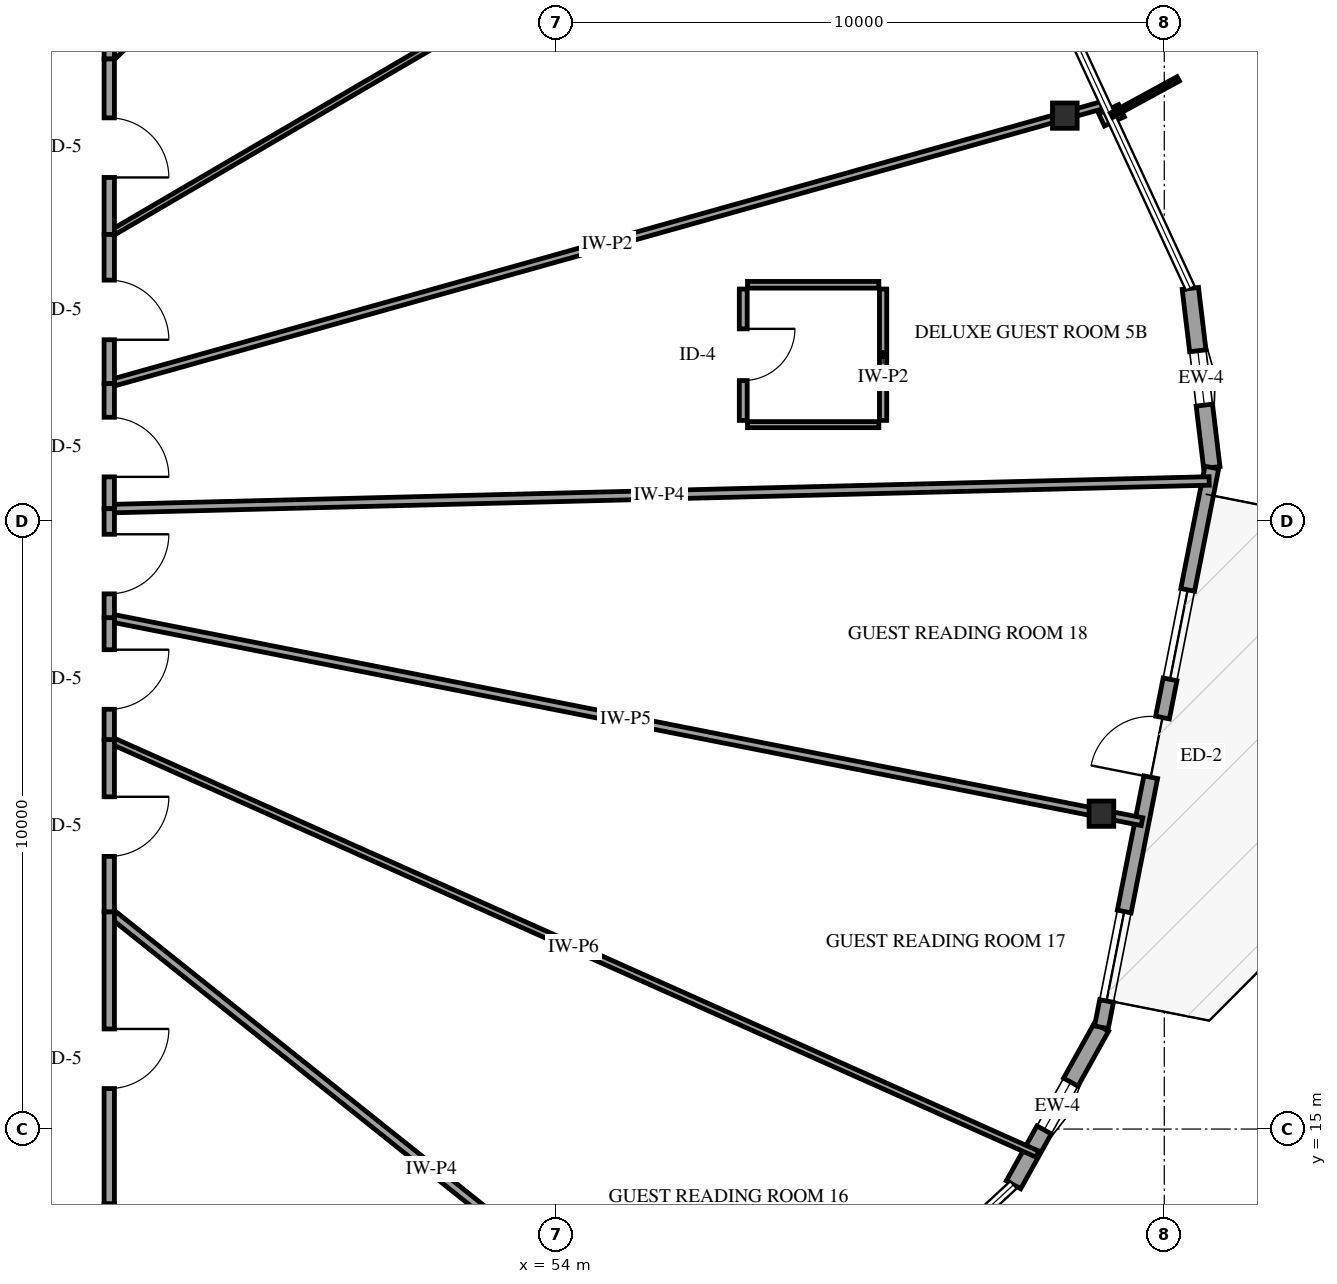
"""IFC4 building model, lengths in metres.
Left out: names, types, materials, properties, quantities, classifications, styles, units other than length and angle.
Written with IfcOpenShell. Run it as: python <this file> out.ifc"""

import sys

from ifc_helpers import new_model, si_unit, direction, frame, frame_2d, origin, origin_2d, place, context, subcontext, project, spatial, rectangle, i_section, extrude, element, fill, save


model = new_model("IFC4")
c1 = context("Model", 3, precision=1e-05, world=origin(), true_north=direction((0.0, 1.0)))
c2 = subcontext(c1, "Body", "Model", "MODEL_VIEW")
j1 = project(units=[si_unit("LENGTHUNIT", "METRE"), si_unit("PLANEANGLEUNIT", "RADIAN")], contexts=[c1])
p1 = place(None, origin())
s1 = spatial("IfcSite", under=j1, at=p1, CompositionType="ELEMENT")
p2 = place(p1, origin())
s2 = spatial("IfcBuilding", under=s1, at=p2, CompositionType="ELEMENT")
p3 = place(p2, frame((0.0, 0.0, 190.6)))
s3 = spatial("IfcBuildingStorey", under=s2, at=p3, CompositionType="ELEMENT", Elevation=190.6)
for number, where, z_axis, x_axis in (
    (1, (62.365, 31.666, -0.3), (0.0, 0.0, 1.0), (1.0, 0.0, 0.0)),
    (2, (62.966, 20.186, -0.3), (0.0, 0.0, 1.0), (1.0, 0.0, 0.0)),
):
    element("IfcColumn", number, at=place(p3, frame(where, z_axis=z_axis, x_axis=x_axis)), inside=s3, PredefinedType="COLUMN", context=c2, shape_type="SweptSolid", body=[
        extrude(i_section(OverallWidth=0.406, OverallDepth=0.416, WebThickness=0.03, FlangeThickness=0.048, FilletRadius=0.038, at=origin_2d()), origin(), (0.0, 0.0, 1.0), 3.9),
    ])
p4 = place(p3, frame((61.521, 14.083, 0.0), z_axis=(0.0, 0.0, 1.0), x_axis=(0.48724212473, 0.87326691904, 0.0)))
e3 = element("IfcWall", 3, at=p4, inside=s3, PredefinedType="SOLIDWALL", context=c2, shape_type="SweptSolid", body=[
    extrude(rectangle(XDim=2.967, YDim=0.27, at=frame_2d((1.483, 0.0))), origin(), (0.0, 0.0, 1.0), 2.679),
])
p5 = place(p4, frame((1.033, 0.0, 0.75)))
e4 = element("IfcOpeningElement", 4, at=p5, cuts=e3, PredefinedType="OPENING", context=c2, shape_type="SweptSolid", body=[
    extrude(rectangle(XDim=0.9, YDim=1.5, at=frame_2d((0.45, 0.75))), frame((0.0, 0.145, 0.0), z_axis=(0.0, -1.0, 0.0), x_axis=(1.0, 0.0, 0.0)), (0.0, 0.0, 1.0), 0.29),
])
p6 = place(p3, frame((64.782, 25.879, 0.0), z_axis=(0.0, 0.0, 1.0), x_axis=(-0.119080319242, 0.9928846245, 0.0)))
e5 = element("IfcWall", 5, at=p6, inside=s3, PredefinedType="SOLIDWALL", context=c2, shape_type="SweptSolid", body=[
    extrude(rectangle(XDim=2.967, YDim=0.27, at=frame_2d((1.483, 0.0))), origin(), (0.0, 0.0, 1.0), 2.679),
])
p7 = place(p6, frame((1.033, 0.0, 0.75)))
e6 = element("IfcOpeningElement", 6, at=p7, cuts=e5, PredefinedType="OPENING", context=c2, shape_type="SweptSolid", body=[
    extrude(rectangle(XDim=0.9, YDim=1.5, at=frame_2d((0.45, 0.75))), frame((0.0, 0.145, 0.0), z_axis=(0.0, -1.0, 0.0), x_axis=(1.0, 0.0, 0.0)), (0.0, 0.0, 1.0), 0.29),
])
p8 = place(p3, frame((62.966, 16.674, 0.0), z_axis=(0.0, 0.0, 1.0), x_axis=(0.193553277769, 0.981089765855, 0.0)))
e7 = element("IfcWall", 7, at=p8, inside=s3, PredefinedType="SOLIDWALL", context=c2, shape_type="SweptSolid", body=[
    extrude(rectangle(XDim=9.382, YDim=0.23, at=frame_2d((4.691, 0.0))), origin(), (0.0, 0.0, 1.0), 2.679),
])
p9 = place(p8, frame((4.191, 0.0, 0.0)))
e8 = element("IfcOpeningElement", 8, at=p9, cuts=e7, PredefinedType="OPENING", context=c2, shape_type="SweptSolid", body=[
    extrude(rectangle(XDim=1.0, YDim=2.15, at=frame_2d((0.5, 1.075))), frame((0.0, 0.125, 0.0), z_axis=(0.0, -1.0, 0.0), x_axis=(1.0, 0.0, 0.0)), (0.0, 0.0, 1.0), 0.25),
])
p10 = place(p8, frame((0.44, 0.0, 0.72)))
e9 = element("IfcOpeningElement", 9, at=p10, cuts=e7, PredefinedType="OPENING", context=c2, shape_type="SweptSolid", body=[
    extrude(rectangle(XDim=1.5, YDim=1.7, at=frame_2d((0.75, 0.85))), frame((0.0, 0.125, 0.0), z_axis=(0.0, -1.0, 0.0), x_axis=(1.0, 0.0, 0.0)), (0.0, 0.0, 1.0), 0.25),
])
p11 = place(p8, frame((5.831, 0.0, 0.72)))
e10 = element("IfcOpeningElement", 10, at=p11, cuts=e7, PredefinedType="OPENING", context=c2, shape_type="SweptSolid", body=[
    extrude(rectangle(XDim=1.5, YDim=1.7, at=frame_2d((0.75, 0.85))), frame((0.0, 0.125, 0.0), z_axis=(0.0, -1.0, 0.0), x_axis=(1.0, 0.0, 0.0)), (0.0, 0.0, 1.0), 0.25),
])
p12 = place(p3, frame((64.738, 25.658, 0.0), z_axis=(0.0, 0.0, 1.0), x_axis=(-0.999682305801, -0.025204909598, 0.0)))
e11 = element("IfcWall", 11, at=p12, inside=s3, PredefinedType="PARTITIONING", context=c2, shape_type="SweptSolid", body=[
    extrude(rectangle(XDim=18.094, YDim=0.14, at=frame_2d((9.047, 0.0))), origin(), (0.0, 0.0, 1.0), 3.3),
])
p13 = place(p3, frame((46.65, 23.41, 0.0), z_axis=(0.0, 0.0, 1.0), x_axis=(0.981040630624, -0.193802169918, 0.0)))
e12 = element("IfcWall", 12, at=p13, inside=s3, PredefinedType="PARTITIONING", context=c2, shape_type="SweptSolid", body=[
    extrude(rectangle(XDim=17.311, YDim=0.13, at=frame_2d((8.656, 0.0))), origin(), (0.0, 0.0, 1.0), 2.595),
])
p14 = place(p3, frame((46.65, 27.258, 0.0), z_axis=(0.0, 0.0, 1.0), x_axis=(0.962850938161, 0.270033462525, 0.0)))
e13 = element("IfcWall", 13, at=p14, inside=s3, PredefinedType="PARTITIONING", context=c2, shape_type="SweptSolid", body=[
    extrude(rectangle(XDim=17.009, YDim=0.12, at=frame_2d((8.504, 0.0))), origin(), (0.0, 0.0, 1.0), 3.3),
])
p15 = place(p3, frame((46.65, 21.405, 0.0), z_axis=(0.0, 0.0, 1.0), x_axis=(0.913073615339, -0.4077947682, 0.0)))
e14 = element("IfcWall", 14, at=p15, inside=s3, PredefinedType="PARTITIONING", context=c2, shape_type="SweptSolid", body=[
    extrude(rectangle(XDim=16.719, YDim=0.11, at=frame_2d((8.36, 0.0))), origin(), (0.0, 0.0, 1.0), 3.3),
])
p16 = place(p3, frame((46.65, 29.711, 0.0), z_axis=(0.0, 0.0, 1.0), x_axis=(0.863122930512, 0.504993868106, 0.0)))
e15 = element("IfcWall", 15, at=p16, inside=s3, PredefinedType="PARTITIONING", context=c2, shape_type="SweptSolid", body=[
    extrude(rectangle(XDim=15.771, YDim=0.1, at=frame_2d((7.885, 0.0))), origin(), (0.0, 0.0, 1.0), 2.678),
])
p17 = place(p3, frame((46.65, 18.573, 0.0), z_axis=(0.0, 0.0, 1.0), x_axis=(0.781465935212, -0.623947908165, 0.0)))
e16 = element("IfcWall", 16, at=p17, inside=s3, PredefinedType="PARTITIONING", context=c2, shape_type="SweptSolid", body=[
    extrude(rectangle(XDim=13.554, YDim=0.14, at=frame_2d((6.777, 0.0))), origin(), (0.0, 0.0, 1.0), 3.3),
])
p18 = place(p3, frame((46.65, 32.597, 0.0), z_axis=(0.0, 0.0, 1.0), x_axis=(0.727340314182, 0.686276961121, 0.0)))
e17 = element("IfcWall", 17, at=p18, inside=s3, PredefinedType="PARTITIONING", context=c2, shape_type="SweptSolid", body=[
    extrude(rectangle(XDim=12.373, YDim=0.13, at=frame_2d((6.186, 0.0))), origin(), (0.0, 0.0, 1.0), 2.595),
])
p19 = place(p3, frame((46.65, 13.769, 0.0), z_axis=(0.0, 0.0, 1.0), x_axis=(0.582553277152, -0.812792519207, 0.0)))
e18 = element("IfcWall", 18, at=p19, inside=s3, PredefinedType="PARTITIONING", context=c2, shape_type="SweptSolid", body=[
    extrude(rectangle(XDim=9.004, YDim=0.11, at=frame_2d((4.502, 0.0))), origin(), (0.0, 0.0, 1.0), 2.678),
])
p20 = place(p3, frame((46.65, 37.695, 0.0), z_axis=(0.0, 0.0, 1.0), x_axis=(0.0, -1.0, 0.0)))
e19 = element("IfcWall", 19, at=p20, inside=s3, PredefinedType="PARTITIONING", context=c2, shape_type="SweptSolid", body=[
    extrude(rectangle(XDim=5.098, YDim=0.17, at=frame_2d((2.549, 0.0))), origin(), (0.0, 0.0, 1.0), 3.3),
])
p21 = place(p20, frame((2.074, 0.0, 0.0)))
e20 = element("IfcOpeningElement", 20, at=p21, cuts=e19, PredefinedType="OPENING", context=c2, shape_type="SweptSolid", body=[
    extrude(rectangle(XDim=0.98, YDim=2.15, at=frame_2d((0.49, 1.075))), frame((0.0, 0.095, 0.0), z_axis=(0.0, -1.0, 0.0), x_axis=(1.0, 0.0, 0.0)), (0.0, 0.0, 1.0), 0.19),
])
p22 = place(p3, frame((46.65, 18.573, 0.0), z_axis=(0.0, 0.0, 1.0), x_axis=(0.0, -1.0, 0.0)))
e21 = element("IfcWall", 21, at=p22, inside=s3, PredefinedType="PARTITIONING", context=c2, shape_type="SweptSolid", body=[
    extrude(rectangle(XDim=4.804, YDim=0.17, at=frame_2d((2.402, 0.0))), origin(), (0.0, 0.0, 1.0), 3.3),
])
p23 = place(p22, frame((1.927, 0.0, 0.0)))
e22 = element("IfcOpeningElement", 22, at=p23, cuts=e21, PredefinedType="OPENING", context=c2, shape_type="SweptSolid", body=[
    extrude(rectangle(XDim=0.98, YDim=2.15, at=frame_2d((0.49, 1.075))), frame((0.0, 0.095, 0.0), z_axis=(0.0, -1.0, 0.0), x_axis=(1.0, 0.0, 0.0)), (0.0, 0.0, 1.0), 0.19),
])
p24 = place(p3, frame((46.65, 32.597, 0.0), z_axis=(0.0, 0.0, 1.0), x_axis=(0.0, -1.0, 0.0)))
e23 = element("IfcWall", 23, at=p24, inside=s3, PredefinedType="PARTITIONING", context=c2, shape_type="SweptSolid", body=[
    extrude(rectangle(XDim=2.886, YDim=0.17, at=frame_2d((1.443, 0.0))), origin(), (0.0, 0.0, 1.0), 3.3),
])
p25 = place(p24, frame((0.968, 0.0, 0.0)))
e24 = element("IfcOpeningElement", 24, at=p25, cuts=e23, PredefinedType="OPENING", context=c2, shape_type="SweptSolid", body=[
    extrude(rectangle(XDim=0.98, YDim=2.15, at=frame_2d((0.49, 1.075))), frame((0.0, 0.095, 0.0), z_axis=(0.0, -1.0, 0.0), x_axis=(1.0, 0.0, 0.0)), (0.0, 0.0, 1.0), 0.19),
])
p26 = place(p3, frame((46.65, 21.405, 0.0), z_axis=(0.0, 0.0, 1.0), x_axis=(0.0, -1.0, 0.0)))
e25 = element("IfcWall", 25, at=p26, inside=s3, PredefinedType="PARTITIONING", context=c2, shape_type="SweptSolid", body=[
    extrude(rectangle(XDim=2.832, YDim=0.17, at=frame_2d((1.416, 0.0))), origin(), (0.0, 0.0, 1.0), 3.3),
])
p27 = place(p26, frame((0.941, 0.0, 0.0)))
e26 = element("IfcOpeningElement", 26, at=p27, cuts=e25, PredefinedType="OPENING", context=c2, shape_type="SweptSolid", body=[
    extrude(rectangle(XDim=0.98, YDim=2.15, at=frame_2d((0.49, 1.075))), frame((0.0, 0.095, 0.0), z_axis=(0.0, -1.0, 0.0), x_axis=(1.0, 0.0, 0.0)), (0.0, 0.0, 1.0), 0.19),
])
p28 = place(p3, frame((46.65, 29.711, 0.0), z_axis=(0.0, 0.0, 1.0), x_axis=(0.0, -1.0, 0.0)))
e27 = element("IfcWall", 27, at=p28, inside=s3, PredefinedType="PARTITIONING", context=c2, shape_type="SweptSolid", body=[
    extrude(rectangle(XDim=2.453, YDim=0.17, at=frame_2d((1.227, 0.0))), origin(), (0.0, 0.0, 1.0), 3.3),
])
p29 = place(p28, frame((0.751, 0.0, 0.0)))
e28 = element("IfcOpeningElement", 28, at=p29, cuts=e27, PredefinedType="OPENING", context=c2, shape_type="SweptSolid", body=[
    extrude(rectangle(XDim=0.98, YDim=2.15, at=frame_2d((0.49, 1.075))), frame((0.0, 0.095, 0.0), z_axis=(0.0, -1.0, 0.0), x_axis=(1.0, 0.0, 0.0)), (0.0, 0.0, 1.0), 0.19),
])
p30 = place(p3, frame((57.076, 28.814, 0.0), z_axis=(0.0, 0.0, 1.0), x_axis=(0.0, -1.0, 0.0)))
e29 = element("IfcWall", 29, at=p30, inside=s3, PredefinedType="PARTITIONING", context=c2, shape_type="SweptSolid", body=[
    extrude(rectangle(XDim=2.16, YDim=0.13, at=frame_2d((1.08, 0.0))), origin(), (0.0, 0.0, 1.0), 3.3),
])
p31 = place(p30, frame((0.655, 0.0, 0.0)))
e30 = element("IfcOpeningElement", 30, at=p31, cuts=e29, PredefinedType="OPENING", context=c2, shape_type="SweptSolid", body=[
    extrude(rectangle(XDim=0.85, YDim=2.1, at=frame_2d((0.425, 1.05))), frame((0.0, 0.075, 0.0), z_axis=(0.0, -1.0, 0.0), x_axis=(1.0, 0.0, 0.0)), (0.0, 0.0, 1.0), 0.15),
])
p32 = place(p3, frame((59.376, 26.654, 0.0), z_axis=(0.0, 0.0, 1.0), x_axis=(0.0, 1.0, 0.0)))
e31 = element("IfcWall", 31, at=p32, inside=s3, PredefinedType="PARTITIONING", context=c2, shape_type="SweptSolid", body=[
    extrude(rectangle(XDim=2.16, YDim=0.12, at=frame_2d((1.08, 0.0))), origin(), (0.0, 0.0, 1.0), 3.3),
])
p33 = place(p3, frame((59.306, 28.884, 0.0), z_axis=(0.0, 0.0, 1.0), x_axis=(-1.0, 0.0, 0.0)))
e32 = element("IfcWall", 32, at=p33, inside=s3, PredefinedType="PARTITIONING", context=c2, shape_type="SweptSolid", body=[
    extrude(rectangle(XDim=2.16, YDim=0.11, at=frame_2d((1.08, 0.0))), origin(), (0.0, 0.0, 1.0), 3.3),
])
p34 = place(p3, frame((57.146, 26.584, 0.0), z_axis=(0.0, 0.0, 1.0), x_axis=(1.0, 0.0, 0.0)))
e33 = element("IfcWall", 33, at=p34, inside=s3, PredefinedType="PARTITIONING", context=c2, shape_type="SweptSolid", body=[
    extrude(rectangle(XDim=2.16, YDim=0.1, at=frame_2d((1.08, 0.0))), origin(), (0.0, 0.0, 1.0), 3.3),
])
p35 = place(p3, frame((46.65, 27.258, 0.0), z_axis=(0.0, 0.0, 1.0), x_axis=(0.0, -1.0, 0.0)))
e34 = element("IfcWall", 34, at=p35, inside=s3, PredefinedType="PARTITIONING", context=c2, shape_type="SweptSolid", body=[
    extrude(rectangle(XDim=2.056, YDim=0.17, at=frame_2d((1.028, 0.0))), origin(), (0.0, 0.0, 1.0), 3.3),
])
p36 = place(p35, frame((0.553, 0.0, 0.0)))
e35 = element("IfcOpeningElement", 35, at=p36, cuts=e34, PredefinedType="OPENING", context=c2, shape_type="SweptSolid", body=[
    extrude(rectangle(XDim=0.98, YDim=2.15, at=frame_2d((0.49, 1.075))), frame((0.0, 0.095, 0.0), z_axis=(0.0, -1.0, 0.0), x_axis=(1.0, 0.0, 0.0)), (0.0, 0.0, 1.0), 0.19),
])
p37 = place(p3, frame((46.65, 23.41, 0.0), z_axis=(0.0, 0.0, 1.0), x_axis=(0.0, -1.0, 0.0)))
e36 = element("IfcWall", 36, at=p37, inside=s3, PredefinedType="PARTITIONING", context=c2, shape_type="SweptSolid", body=[
    extrude(rectangle(XDim=2.005, YDim=0.17, at=frame_2d((1.002, 0.0))), origin(), (0.0, 0.0, 1.0), 3.3),
])
p38 = place(p37, frame((0.527, 0.0, 0.0)))
e37 = element("IfcOpeningElement", 37, at=p38, cuts=e36, PredefinedType="OPENING", context=c2, shape_type="SweptSolid", body=[
    extrude(rectangle(XDim=0.98, YDim=2.15, at=frame_2d((0.49, 1.075))), frame((0.0, 0.095, 0.0), z_axis=(0.0, -1.0, 0.0), x_axis=(1.0, 0.0, 0.0)), (0.0, 0.0, 1.0), 0.19),
])
p39 = place(p3, frame((46.65, 25.202, 0.0), z_axis=(0.0, 0.0, 1.0), x_axis=(0.0, -1.0, 0.0)))
e38 = element("IfcWall", 38, at=p39, inside=s3, PredefinedType="PARTITIONING", context=c2, shape_type="SweptSolid", body=[
    extrude(rectangle(XDim=1.792, YDim=0.17, at=frame_2d((0.896, 0.0))), origin(), (0.0, 0.0, 1.0), 3.3),
])
p40 = place(p39, frame((0.421, 0.0, 0.0)))
e39 = element("IfcOpeningElement", 39, at=p40, cuts=e38, PredefinedType="OPENING", context=c2, shape_type="SweptSolid", body=[
    extrude(rectangle(XDim=0.98, YDim=2.15, at=frame_2d((0.49, 1.075))), frame((0.0, 0.095, 0.0), z_axis=(0.0, -1.0, 0.0), x_axis=(1.0, 0.0, 0.0)), (0.0, 0.0, 1.0), 0.19),
])
p41 = place(p3, frame((46.65, 13.769, 0.0), z_axis=(0.0, 0.0, 1.0), x_axis=(0.0, -1.0, 0.0)))
e40 = element("IfcWall", 40, at=p41, inside=s3, PredefinedType="PARTITIONING", context=c2, shape_type="SweptSolid", body=[
    extrude(rectangle(XDim=0.749, YDim=0.17, at=frame_2d((0.375, 0.0))), origin(), (0.0, 0.0, 1.0), 3.3),
])
p42 = place(p5, origin())
e41 = element("IfcWindow", 41, at=p42, inside=s3, PartitioningType="SINGLE_PANEL", PredefinedType="WINDOW", context=c2, shape_type="SweptSolid", body=[
    extrude(rectangle(XDim=0.9, YDim=1.5, at=frame_2d((0.45, 0.75))), frame((0.0, 0.03, 0.0), z_axis=(0.0, -1.0, 0.0), x_axis=(1.0, 0.0, 0.0)), (0.0, 0.0, 1.0), 0.06),
])
fill(e4, e41)
p43 = place(p7, origin())
e42 = element("IfcWindow", 42, at=p43, inside=s3, PartitioningType="SINGLE_PANEL", PredefinedType="WINDOW", context=c2, shape_type="SweptSolid", body=[
    extrude(rectangle(XDim=0.9, YDim=1.5, at=frame_2d((0.45, 0.75))), frame((0.0, 0.03, 0.0), z_axis=(0.0, -1.0, 0.0), x_axis=(1.0, 0.0, 0.0)), (0.0, 0.0, 1.0), 0.06),
])
fill(e6, e42)
p44 = place(p9, origin())
e43 = element("IfcDoor", 43, at=p44, inside=s3, OperationType="SINGLE_SWING_LEFT", PredefinedType="DOOR", context=c2, shape_type="SweptSolid", body=[
    extrude(rectangle(XDim=1.0, YDim=2.15, at=frame_2d((0.5, 1.075))), frame((0.0, 0.025, 0.0), z_axis=(0.0, -1.0, 0.0), x_axis=(1.0, 0.0, 0.0)), (0.0, 0.0, 1.0), 0.05),
])
fill(e8, e43)
p45 = place(p10, origin())
e44 = element("IfcWindow", 44, at=p45, inside=s3, PartitioningType="SINGLE_PANEL", PredefinedType="WINDOW", context=c2, shape_type="SweptSolid", body=[
    extrude(rectangle(XDim=1.5, YDim=1.7, at=frame_2d((0.75, 0.85))), frame((0.0, 0.03, 0.0), z_axis=(0.0, -1.0, 0.0), x_axis=(1.0, 0.0, 0.0)), (0.0, 0.0, 1.0), 0.06),
])
fill(e9, e44)
p46 = place(p11, origin())
e45 = element("IfcWindow", 45, at=p46, inside=s3, PartitioningType="SINGLE_PANEL", PredefinedType="WINDOW", context=c2, shape_type="SweptSolid", body=[
    extrude(rectangle(XDim=1.5, YDim=1.7, at=frame_2d((0.75, 0.85))), frame((0.0, 0.03, 0.0), z_axis=(0.0, -1.0, 0.0), x_axis=(1.0, 0.0, 0.0)), (0.0, 0.0, 1.0), 0.06),
])
fill(e10, e45)
p47 = place(p23, origin())
e46 = element("IfcDoor", 46, at=p47, inside=s3, OperationType="SINGLE_SWING_LEFT", PredefinedType="DOOR", context=c2, shape_type="SweptSolid", body=[
    extrude(rectangle(XDim=0.98, YDim=2.15, at=frame_2d((0.49, 1.075))), frame((0.0, 0.025, 0.0), z_axis=(0.0, -1.0, 0.0), x_axis=(1.0, 0.0, 0.0)), (0.0, 0.0, 1.0), 0.05),
])
fill(e22, e46)
p48 = place(p25, origin())
e47 = element("IfcDoor", 47, at=p48, inside=s3, OperationType="SINGLE_SWING_RIGHT", PredefinedType="DOOR", context=c2, shape_type="SweptSolid", body=[
    extrude(rectangle(XDim=0.98, YDim=2.15, at=frame_2d((0.49, 1.075))), frame((0.0, 0.025, 0.0), z_axis=(0.0, -1.0, 0.0), x_axis=(1.0, 0.0, 0.0)), (0.0, 0.0, 1.0), 0.05),
])
fill(e24, e47)
p49 = place(p27, origin())
e48 = element("IfcDoor", 48, at=p49, inside=s3, OperationType="SINGLE_SWING_LEFT", PredefinedType="DOOR", context=c2, shape_type="SweptSolid", body=[
    extrude(rectangle(XDim=0.98, YDim=2.15, at=frame_2d((0.49, 1.075))), frame((0.0, 0.025, 0.0), z_axis=(0.0, -1.0, 0.0), x_axis=(1.0, 0.0, 0.0)), (0.0, 0.0, 1.0), 0.05),
])
fill(e26, e48)
p50 = place(p29, origin())
e49 = element("IfcDoor", 49, at=p50, inside=s3, OperationType="SINGLE_SWING_RIGHT", PredefinedType="DOOR", context=c2, shape_type="SweptSolid", body=[
    extrude(rectangle(XDim=0.98, YDim=2.15, at=frame_2d((0.49, 1.075))), frame((0.0, 0.025, 0.0), z_axis=(0.0, -1.0, 0.0), x_axis=(1.0, 0.0, 0.0)), (0.0, 0.0, 1.0), 0.05),
])
fill(e28, e49)
p51 = place(p31, origin())
e50 = element("IfcDoor", 50, at=p51, inside=s3, OperationType="SINGLE_SWING_LEFT", PredefinedType="DOOR", context=c2, shape_type="SweptSolid", body=[
    extrude(rectangle(XDim=0.85, YDim=2.1, at=frame_2d((0.425, 1.05))), frame((0.0, 0.025, 0.0), z_axis=(0.0, -1.0, 0.0), x_axis=(1.0, 0.0, 0.0)), (0.0, 0.0, 1.0), 0.05),
])
fill(e30, e50)
p52 = place(p36, origin())
e51 = element("IfcDoor", 51, at=p52, inside=s3, OperationType="SINGLE_SWING_RIGHT", PredefinedType="DOOR", context=c2, shape_type="SweptSolid", body=[
    extrude(rectangle(XDim=0.98, YDim=2.15, at=frame_2d((0.49, 1.075))), frame((0.0, 0.025, 0.0), z_axis=(0.0, -1.0, 0.0), x_axis=(1.0, 0.0, 0.0)), (0.0, 0.0, 1.0), 0.05),
])
fill(e35, e51)
p53 = place(p38, origin())
e52 = element("IfcDoor", 52, at=p53, inside=s3, OperationType="SINGLE_SWING_LEFT", PredefinedType="DOOR", context=c2, shape_type="SweptSolid", body=[
    extrude(rectangle(XDim=0.98, YDim=2.15, at=frame_2d((0.49, 1.075))), frame((0.0, 0.025, 0.0), z_axis=(0.0, -1.0, 0.0), x_axis=(1.0, 0.0, 0.0)), (0.0, 0.0, 1.0), 0.05),
])
fill(e37, e52)
p54 = place(p40, origin())
e53 = element("IfcDoor", 53, at=p54, inside=s3, OperationType="SINGLE_SWING_LEFT", PredefinedType="DOOR", context=c2, shape_type="SweptSolid", body=[
    extrude(rectangle(XDim=0.98, YDim=2.15, at=frame_2d((0.49, 1.075))), frame((0.0, 0.025, 0.0), z_axis=(0.0, -1.0, 0.0), x_axis=(1.0, 0.0, 0.0)), (0.0, 0.0, 1.0), 0.05),
])
fill(e39, e53)
save(model, sys.argv[1])
